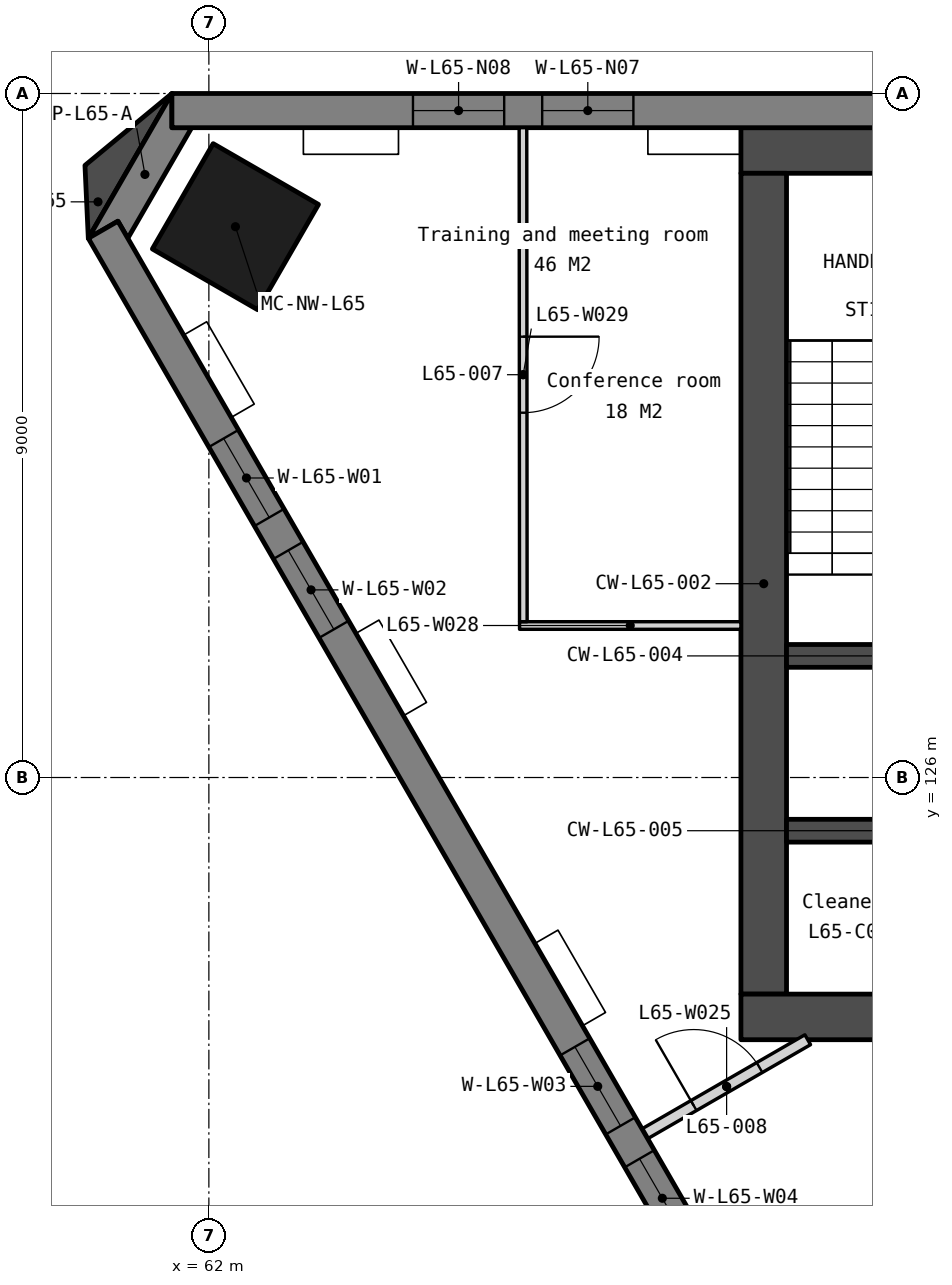
"""IFC4 building model, lengths in metres.
Left out: names, types, materials, properties, quantities, classifications, styles, units other than length and angle.
Written with IfcOpenShell. Run it as: python <this file> out.ifc"""

import sys

from ifc_helpers import new_model, si_unit, direction, frame, frame_2d, origin, origin_2d, place, context, subcontext, project, spatial, polyline, rectangle, outline, extrude, element, fill, save


model = new_model("IFC4")
c1 = context("Model", 3, precision=1e-05, world=origin(), true_north=direction((0.0, 1.0)))
c2 = subcontext(c1, "Body", "Model", "MODEL_VIEW")
j1 = project(units=[si_unit("LENGTHUNIT", "METRE"), si_unit("PLANEANGLEUNIT", "RADIAN")], contexts=[c1])
p1 = place(None, origin())
s1 = spatial("IfcSite", under=j1, at=p1, CompositionType="ELEMENT")
p2 = place(p1, origin())
s2 = spatial("IfcBuilding", under=s1, at=p2, CompositionType="ELEMENT")
p3 = place(p2, frame((0.0, 0.0, 266.0)))
s3 = spatial("IfcBuildingStorey", under=s2, at=p3, CompositionType="ELEMENT", Elevation=266.0)
p4 = place(p3, frame((62.349, 133.247, 0.0), z_axis=(0.0, 0.0, 1.0), x_axis=(-0.5, -0.866025403784, 0.0)))
e1 = element("IfcColumn", 1, at=p4, inside=s3, PredefinedType="COLUMN", context=c2, shape_type="SweptSolid", body=[
    extrude(rectangle(XDim=1.6, YDim=1.6, at=origin_2d()), origin(), (0.0, 0.0, 1.0), 3.9),
])
p5 = place(p3, frame((69.0, 134.25, 0.0), z_axis=(0.0, 0.0, 1.0), x_axis=(1.0, 0.0, 0.0)))
e2 = element("IfcWall", 2, at=p5, inside=s3, PredefinedType="SOLIDWALL", context=c2, shape_type="SweptSolid", body=[
    extrude(rectangle(XDim=22.0, YDim=0.6, at=frame_2d((11.0, 0.0))), origin(), (0.0, 0.0, 1.0), 3.75),
])
p6 = place(p3, frame((69.3, 133.95, 0.0), z_axis=(0.0, 0.0, 1.0), x_axis=(0.0, -1.0, 0.0)))
e3 = element("IfcWall", 3, at=p6, inside=s3, PredefinedType="SOLIDWALL", context=c2, shape_type="SweptSolid", body=[
    extrude(rectangle(XDim=10.8, YDim=0.6, at=frame_2d((5.4, 0.0))), origin(), (0.0, 0.0, 1.0), 3.75),
])
p7 = place(p3, frame((69.0, 122.85, 0.0), z_axis=(0.0, 0.0, 1.0), x_axis=(1.0, 0.0, 0.0)))
e4 = element("IfcWall", 4, at=p7, inside=s3, PredefinedType="SOLIDWALL", context=c2, shape_type="SweptSolid", body=[
    extrude(rectangle(XDim=22.0, YDim=0.6, at=frame_2d((11.0, 0.0))), origin(), (0.0, 0.0, 1.0), 3.75),
])
p8 = place(p7, frame((16.375, 0.0, 0.0)))
e5 = element("IfcOpeningElement", 5, at=p8, cuts=e4, PredefinedType="OPENING", context=c2, shape_type="SweptSolid", body=[
    extrude(rectangle(XDim=1.8, YDim=2.1, at=frame_2d((0.9, 1.05))), frame((0.0, 0.31, 0.0), z_axis=(0.0, -1.0, 0.0), x_axis=(1.0, 0.0, 0.0)), (0.0, 0.0, 1.0), 0.62),
])
p9 = place(p7, frame((3.825, 0.0, 0.0)))
e6 = element("IfcOpeningElement", 6, at=p9, cuts=e4, PredefinedType="OPENING", context=c2, shape_type="SweptSolid", body=[
    extrude(rectangle(XDim=1.8, YDim=2.1, at=frame_2d((0.9, 1.05))), frame((0.0, 0.31, 0.0), z_axis=(0.0, -1.0, 0.0), x_axis=(1.0, 0.0, 0.0)), (0.0, 0.0, 1.0), 0.62),
])
p10 = place(p7, frame((12.85, 0.0, 0.0)))
e7 = element("IfcOpeningElement", 7, at=p10, cuts=e4, PredefinedType="OPENING", context=c2, shape_type="SweptSolid", body=[
    extrude(rectangle(XDim=1.5, YDim=2.1, at=frame_2d((0.75, 1.05))), frame((0.0, 0.31, 0.0), z_axis=(0.0, -1.0, 0.0), x_axis=(1.0, 0.0, 0.0)), (0.0, 0.0, 1.0), 0.62),
])
for number, where, z_axis, x_axis in (
    (8, (69.6, 127.6, 0.0), (0.0, 0.0, 1.0), (1.0, 0.0, 0.0)),
    (9, (69.6, 125.3, 0.0), (0.0, 0.0, 1.0), (1.0, 0.0, 0.0)),
):
    element("IfcWall", number, at=place(p3, frame(where, z_axis=z_axis, x_axis=x_axis)), inside=s3, PredefinedType="SOLIDWALL", context=c2, shape_type="SweptSolid", body=[
        extrude(rectangle(XDim=2.55, YDim=0.3, at=frame_2d((1.275, 0.0))), origin(), (0.0, 0.0, 1.0), 3.75),
    ])
p11 = place(p3, frame((0.0, 0.0, -0.15)))
e10 = element("IfcWall", 10, at=p11, inside=s3, PredefinedType="SOLIDWALL", context=c2, shape_type="SweptSolid", body=[
    extrude(outline(polyline([(61.514, 135.0), (61.514, 134.55), (61.774, 134.55), (60.933, 133.095), (60.803, 133.32), (60.414, 133.095), (61.514, 135.0)])), origin(), (0.0, 0.0, 1.0), 3.9),
])
p12 = place(p3, frame((98.486, 134.775, -0.15), z_axis=(0.0, 0.0, 1.0), x_axis=(-1.0, 0.0, 0.0)))
e11 = element("IfcWall", 11, at=p12, inside=s3, PredefinedType="SOLIDWALL", context=c2, shape_type="SweptSolid", body=[
    extrude(outline(polyline([(36.972, 0.0), (36.972, 3.9), (0.0, 3.9), (0.0, 0.0), (36.972, 0.0)])), frame((0.0, 0.225, 0.0), z_axis=(0.0, -1.0, 0.0), x_axis=(1.0, 0.0, 0.0)), (0.0, 0.0, 1.0), 0.45),
])
p13 = place(p12, frame((3.172, 0.0, 0.95)))
e12 = element("IfcOpeningElement", 12, at=p13, cuts=e11, PredefinedType="OPENING", context=c2, shape_type="SweptSolid", body=[
    extrude(rectangle(XDim=1.2, YDim=2.2, at=frame_2d((0.6, 1.1))), frame((0.0, 0.235, 0.0), z_axis=(0.0, -1.0, 0.0), x_axis=(1.0, 0.0, 0.0)), (0.0, 0.0, 1.0), 0.47),
])
p14 = place(p12, frame((4.872, 0.0, 0.95)))
e13 = element("IfcOpeningElement", 13, at=p14, cuts=e11, PredefinedType="OPENING", context=c2, shape_type="SweptSolid", body=[
    extrude(rectangle(XDim=1.2, YDim=2.2, at=frame_2d((0.6, 1.1))), frame((0.0, 0.235, 0.0), z_axis=(0.0, -1.0, 0.0), x_axis=(1.0, 0.0, 0.0)), (0.0, 0.0, 1.0), 0.47),
])
p15 = place(p12, frame((12.415, 0.0, 0.95)))
e14 = element("IfcOpeningElement", 14, at=p15, cuts=e11, PredefinedType="OPENING", context=c2, shape_type="SweptSolid", body=[
    extrude(rectangle(XDim=1.2, YDim=2.2, at=frame_2d((0.6, 1.1))), frame((0.0, 0.235, 0.0), z_axis=(0.0, -1.0, 0.0), x_axis=(1.0, 0.0, 0.0)), (0.0, 0.0, 1.0), 0.47),
])
p16 = place(p12, frame((14.115, 0.0, 0.95)))
e15 = element("IfcOpeningElement", 15, at=p16, cuts=e11, PredefinedType="OPENING", context=c2, shape_type="SweptSolid", body=[
    extrude(rectangle(XDim=1.2, YDim=2.2, at=frame_2d((0.6, 1.1))), frame((0.0, 0.235, 0.0), z_axis=(0.0, -1.0, 0.0), x_axis=(1.0, 0.0, 0.0)), (0.0, 0.0, 1.0), 0.47),
])
p17 = place(p12, frame((21.658, 0.0, 0.95)))
e16 = element("IfcOpeningElement", 16, at=p17, cuts=e11, PredefinedType="OPENING", context=c2, shape_type="SweptSolid", body=[
    extrude(rectangle(XDim=1.2, YDim=2.2, at=frame_2d((0.6, 1.1))), frame((0.0, 0.235, 0.0), z_axis=(0.0, -1.0, 0.0), x_axis=(1.0, 0.0, 0.0)), (0.0, 0.0, 1.0), 0.47),
])
p18 = place(p12, frame((23.358, 0.0, 0.95)))
e17 = element("IfcOpeningElement", 17, at=p18, cuts=e11, PredefinedType="OPENING", context=c2, shape_type="SweptSolid", body=[
    extrude(rectangle(XDim=1.2, YDim=2.2, at=frame_2d((0.6, 1.1))), frame((0.0, 0.235, 0.0), z_axis=(0.0, -1.0, 0.0), x_axis=(1.0, 0.0, 0.0)), (0.0, 0.0, 1.0), 0.47),
])
p19 = place(p12, frame((30.901, 0.0, 0.95)))
e18 = element("IfcOpeningElement", 18, at=p19, cuts=e11, PredefinedType="OPENING", context=c2, shape_type="SweptSolid", body=[
    extrude(rectangle(XDim=1.2, YDim=2.2, at=frame_2d((0.6, 1.1))), frame((0.0, 0.235, 0.0), z_axis=(0.0, -1.0, 0.0), x_axis=(1.0, 0.0, 0.0)), (0.0, 0.0, 1.0), 0.47),
])
p20 = place(p12, frame((32.601, 0.0, 0.95)))
e19 = element("IfcOpeningElement", 19, at=p20, cuts=e11, PredefinedType="OPENING", context=c2, shape_type="SweptSolid", body=[
    extrude(rectangle(XDim=1.2, YDim=2.2, at=frame_2d((0.6, 1.1))), frame((0.0, 0.235, 0.0), z_axis=(0.0, -1.0, 0.0), x_axis=(1.0, 0.0, 0.0)), (0.0, 0.0, 1.0), 0.47),
])
p21 = place(p3, frame((60.609, 133.207, -0.15), z_axis=(0.0, 0.0, 1.0), x_axis=(0.500002536638, -0.866023939251, 0.0)))
e20 = element("IfcWall", 20, at=p21, inside=s3, PredefinedType="SOLIDWALL", context=c2, shape_type="SweptSolid", body=[
    extrude(outline(polyline([(36.972, 0.0), (36.972, 3.9), (0.0, 3.9), (0.0, 0.0), (36.972, 0.0)])), frame((0.0, 0.225, 0.0), z_axis=(0.0, -1.0, 0.0), x_axis=(1.0, 0.0, 0.0)), (0.0, 0.0, 1.0), 0.45),
])
p22 = place(p21, frame((3.172, 0.0, 0.95)))
e21 = element("IfcOpeningElement", 21, at=p22, cuts=e20, PredefinedType="OPENING", context=c2, shape_type="SweptSolid", body=[
    extrude(rectangle(XDim=1.2, YDim=2.2, at=frame_2d((0.6, 1.1))), frame((0.0, 0.235, 0.0), z_axis=(0.0, -1.0, 0.0), x_axis=(1.0, 0.0, 0.0)), (0.0, 0.0, 1.0), 0.47),
])
p23 = place(p21, frame((4.872, 0.0, 0.95)))
e22 = element("IfcOpeningElement", 22, at=p23, cuts=e20, PredefinedType="OPENING", context=c2, shape_type="SweptSolid", body=[
    extrude(rectangle(XDim=1.2, YDim=2.2, at=frame_2d((0.6, 1.1))), frame((0.0, 0.235, 0.0), z_axis=(0.0, -1.0, 0.0), x_axis=(1.0, 0.0, 0.0)), (0.0, 0.0, 1.0), 0.47),
])
p24 = place(p21, frame((12.415, 0.0, 0.95)))
e23 = element("IfcOpeningElement", 23, at=p24, cuts=e20, PredefinedType="OPENING", context=c2, shape_type="SweptSolid", body=[
    extrude(rectangle(XDim=1.2, YDim=2.2, at=frame_2d((0.6, 1.1))), frame((0.0, 0.235, 0.0), z_axis=(0.0, -1.0, 0.0), x_axis=(1.0, 0.0, 0.0)), (0.0, 0.0, 1.0), 0.47),
])
p25 = place(p21, frame((14.115, 0.0, 0.95)))
e24 = element("IfcOpeningElement", 24, at=p25, cuts=e20, PredefinedType="OPENING", context=c2, shape_type="SweptSolid", body=[
    extrude(rectangle(XDim=1.2, YDim=2.2, at=frame_2d((0.6, 1.1))), frame((0.0, 0.235, 0.0), z_axis=(0.0, -1.0, 0.0), x_axis=(1.0, 0.0, 0.0)), (0.0, 0.0, 1.0), 0.47),
])
p26 = place(p21, frame((21.658, 0.0, 0.95)))
e25 = element("IfcOpeningElement", 25, at=p26, cuts=e20, PredefinedType="OPENING", context=c2, shape_type="SweptSolid", body=[
    extrude(rectangle(XDim=1.2, YDim=2.2, at=frame_2d((0.6, 1.1))), frame((0.0, 0.235, 0.0), z_axis=(0.0, -1.0, 0.0), x_axis=(1.0, 0.0, 0.0)), (0.0, 0.0, 1.0), 0.47),
])
p27 = place(p21, frame((23.358, 0.0, 0.95)))
e26 = element("IfcOpeningElement", 26, at=p27, cuts=e20, PredefinedType="OPENING", context=c2, shape_type="SweptSolid", body=[
    extrude(rectangle(XDim=1.2, YDim=2.2, at=frame_2d((0.6, 1.1))), frame((0.0, 0.235, 0.0), z_axis=(0.0, -1.0, 0.0), x_axis=(1.0, 0.0, 0.0)), (0.0, 0.0, 1.0), 0.47),
])
p28 = place(p21, frame((30.901, 0.0, 0.95)))
e27 = element("IfcOpeningElement", 27, at=p28, cuts=e20, PredefinedType="OPENING", context=c2, shape_type="SweptSolid", body=[
    extrude(rectangle(XDim=1.2, YDim=2.2, at=frame_2d((0.6, 1.1))), frame((0.0, 0.235, 0.0), z_axis=(0.0, -1.0, 0.0), x_axis=(1.0, 0.0, 0.0)), (0.0, 0.0, 1.0), 0.47),
])
p29 = place(p21, frame((32.601, 0.0, 0.95)))
e28 = element("IfcOpeningElement", 28, at=p29, cuts=e20, PredefinedType="OPENING", context=c2, shape_type="SweptSolid", body=[
    extrude(rectangle(XDim=1.2, YDim=2.2, at=frame_2d((0.6, 1.1))), frame((0.0, 0.235, 0.0), z_axis=(0.0, -1.0, 0.0), x_axis=(1.0, 0.0, 0.0)), (0.0, 0.0, 1.0), 0.47),
])
p30 = place(p3, frame((0.0, 0.0, -0.15)))
e29 = element("IfcWall", 29, at=p30, inside=s3, PredefinedType="SOLIDWALL", context=c2, shape_type="SweptSolid", body=[
    extrude(outline(polyline([(61.514, 135.0), (60.37, 134.054), (60.414, 133.095), (61.514, 135.0)])), origin(), (0.0, 0.0, 1.0), 3.9),
])
p31 = place(p3, frame((67.745, 121.318, 0.0), z_axis=(0.0, 0.0, 1.0), x_axis=(0.865990916707, 0.500059728613, 0.0)))
e30 = element("IfcWall", 30, at=p31, inside=s3, PredefinedType="PARTITIONING", context=c2, shape_type="SweptSolid", body=[
    extrude(rectangle(XDim=2.465, YDim=0.15, at=frame_2d((1.232, 0.0))), origin(), (0.0, 0.0, 1.0), 3.75),
])
p32 = place(p31, frame((0.732, 0.0, 0.0)))
e31 = element("IfcOpeningElement", 31, at=p32, cuts=e30, PredefinedType="OPENING", context=c2, shape_type="SweptSolid", body=[
    extrude(rectangle(XDim=1.0, YDim=2.1, at=frame_2d((0.5, 1.05))), frame((0.0, 0.085, 0.0), z_axis=(0.0, -1.0, 0.0), x_axis=(1.0, 0.0, 0.0)), (0.0, 0.0, 1.0), 0.17),
])
p33 = place(p3, frame((66.087, 128.0, 0.0), z_axis=(0.0, 0.0, 1.0), x_axis=(1.0, 0.0, 0.0)))
e32 = element("IfcWall", 32, at=p33, inside=s3, PredefinedType="PARTITIONING", context=c2, shape_type="SweptSolid", body=[
    extrude(rectangle(XDim=2.913, YDim=0.1, at=frame_2d((1.456, 0.0))), origin(), (0.0, 0.0, 1.0), 3.75),
])
p34 = place(p3, frame((66.132, 134.55, 0.0), z_axis=(0.0, 0.0, 1.0), x_axis=(0.000788761774, -0.999999688927, 0.0)))
e33 = element("IfcWall", 33, at=p34, inside=s3, PredefinedType="PARTITIONING", context=c2, shape_type="SweptSolid", body=[
    extrude(rectangle(XDim=6.5, YDim=0.1, at=frame_2d((3.25, 0.0))), origin(), (0.0, 0.0, 1.0), 3.75),
])
p35 = place(p34, frame((2.75, 0.0, 0.0)))
e34 = element("IfcOpeningElement", 34, at=p35, cuts=e33, PredefinedType="OPENING", context=c2, shape_type="SweptSolid", body=[
    extrude(rectangle(XDim=1.0, YDim=2.1, at=frame_2d((0.5, 1.05))), frame((0.0, 0.06, 0.0), z_axis=(0.0, -1.0, 0.0), x_axis=(1.0, 0.0, 0.0)), (0.0, 0.0, 1.0), 0.12),
])
p36 = place(p19, origin())
e35 = element("IfcWindow", 35, at=p36, inside=s3, PartitioningType="SINGLE_PANEL", PredefinedType="WINDOW", context=c2, shape_type="SweptSolid", body=[
    extrude(rectangle(XDim=1.2, YDim=2.2, at=frame_2d((0.6, 1.1))), frame((0.0, 0.03, 0.0), z_axis=(0.0, -1.0, 0.0), x_axis=(1.0, 0.0, 0.0)), (0.0, 0.0, 1.0), 0.06),
])
fill(e18, e35)
p37 = place(p20, origin())
e36 = element("IfcWindow", 36, at=p37, inside=s3, PartitioningType="SINGLE_PANEL", PredefinedType="WINDOW", context=c2, shape_type="SweptSolid", body=[
    extrude(rectangle(XDim=1.2, YDim=2.2, at=frame_2d((0.6, 1.1))), frame((0.0, 0.03, 0.0), z_axis=(0.0, -1.0, 0.0), x_axis=(1.0, 0.0, 0.0)), (0.0, 0.0, 1.0), 0.06),
])
fill(e19, e36)
p38 = place(p22, origin())
e37 = element("IfcWindow", 37, at=p38, inside=s3, PartitioningType="SINGLE_PANEL", PredefinedType="WINDOW", context=c2, shape_type="SweptSolid", body=[
    extrude(rectangle(XDim=1.2, YDim=2.2, at=frame_2d((0.6, 1.1))), frame((0.0, 0.03, 0.0), z_axis=(0.0, -1.0, 0.0), x_axis=(1.0, 0.0, 0.0)), (0.0, 0.0, 1.0), 0.06),
])
fill(e21, e37)
p39 = place(p23, origin())
e38 = element("IfcWindow", 38, at=p39, inside=s3, PartitioningType="SINGLE_PANEL", PredefinedType="WINDOW", context=c2, shape_type="SweptSolid", body=[
    extrude(rectangle(XDim=1.2, YDim=2.2, at=frame_2d((0.6, 1.1))), frame((0.0, 0.03, 0.0), z_axis=(0.0, -1.0, 0.0), x_axis=(1.0, 0.0, 0.0)), (0.0, 0.0, 1.0), 0.06),
])
fill(e22, e38)
p40 = place(p24, origin())
e39 = element("IfcWindow", 39, at=p40, inside=s3, PartitioningType="SINGLE_PANEL", PredefinedType="WINDOW", context=c2, shape_type="SweptSolid", body=[
    extrude(rectangle(XDim=1.2, YDim=2.2, at=frame_2d((0.6, 1.1))), frame((0.0, 0.03, 0.0), z_axis=(0.0, -1.0, 0.0), x_axis=(1.0, 0.0, 0.0)), (0.0, 0.0, 1.0), 0.06),
])
fill(e23, e39)
p41 = place(p25, origin())
e40 = element("IfcWindow", 40, at=p41, inside=s3, PartitioningType="SINGLE_PANEL", PredefinedType="WINDOW", context=c2, shape_type="SweptSolid", body=[
    extrude(rectangle(XDim=1.2, YDim=2.2, at=frame_2d((0.6, 1.1))), frame((0.0, 0.03, 0.0), z_axis=(0.0, -1.0, 0.0), x_axis=(1.0, 0.0, 0.0)), (0.0, 0.0, 1.0), 0.06),
])
fill(e24, e40)
p42 = place(p35, origin())
e41 = element("IfcDoor", 41, at=p42, inside=s3, OperationType="SINGLE_SWING_LEFT", PredefinedType="DOOR", context=c2, shape_type="SweptSolid", body=[
    extrude(rectangle(XDim=1.0, YDim=2.1, at=frame_2d((0.5, 1.05))), frame((0.0, 0.025, 0.0), z_axis=(0.0, -1.0, 0.0), x_axis=(1.0, 0.0, 0.0)), (0.0, 0.0, 1.0), 0.05),
])
fill(e34, e41)
p43 = place(p32, origin())
e42 = element("IfcDoor", 42, at=p43, inside=s3, OperationType="SINGLE_SWING_LEFT", PredefinedType="DOOR", context=c2, shape_type="SweptSolid", body=[
    extrude(rectangle(XDim=1.0, YDim=2.1, at=frame_2d((0.5, 1.05))), frame((0.0, 0.025, 0.0), z_axis=(0.0, -1.0, 0.0), x_axis=(1.0, 0.0, 0.0)), (0.0, 0.0, 1.0), 0.05),
])
fill(e31, e42)
save(model, sys.argv[1])
